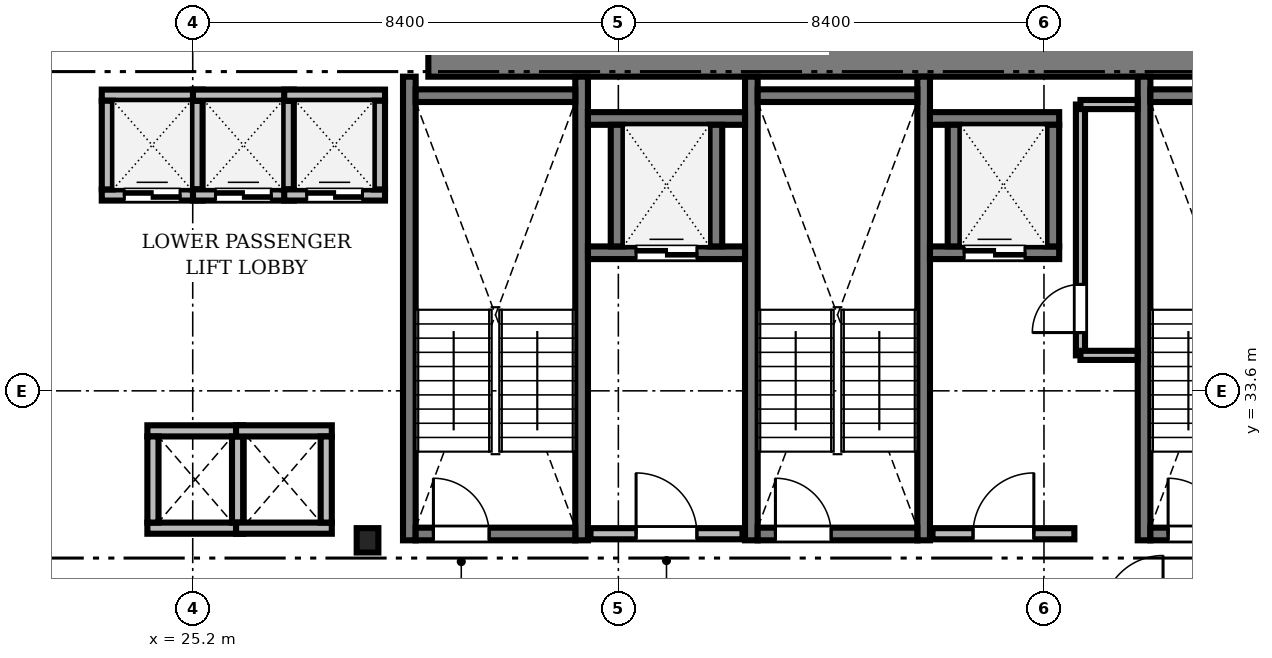
"""IFC4 building model, lengths in metres.
Left out: names, types, materials, properties, quantities, classifications, styles, units other than length and angle.
Written with IfcOpenShell. Run it as: python <this file> out.ifc"""

import sys

from ifc_helpers import new_model, si_unit, direction, frame, frame_2d, origin, origin_2d, place, context, subcontext, project, spatial, rectangle, i_section, extrude, source, transform, mapped, element, fill, save


model = new_model("IFC4")
c1 = context("Model", 3, precision=1e-05, world=origin(), true_north=direction((0.0, 1.0)))
c2 = subcontext(c1, "Body", "Model", "MODEL_VIEW")
j1 = project(units=[si_unit("LENGTHUNIT", "METRE"), si_unit("PLANEANGLEUNIT", "RADIAN")], contexts=[c1])
p1 = place(None, origin())
s1 = spatial("IfcSite", under=j1, at=p1, CompositionType="ELEMENT")
p2 = place(p1, origin())
s2 = spatial("IfcBuilding", under=s1, at=p2, CompositionType="ELEMENT")
p3 = place(p2, frame((0.0, 0.0, 31.25)))
s3 = spatial("IfcBuildingStorey", under=s2, at=p3, CompositionType="ELEMENT", Elevation=31.25)
m1 = source(origin(), c2, "Body", "SweptSolid", [
    extrude(rectangle(XDim=17.52, YDim=1.0, at=frame_2d((8.76, 0.0))), origin(), (0.0, 0.0, 1.0), 3.41),
])
p4 = place(p3, frame((29.85, 40.3, 0.0), z_axis=(0.0, 0.0, 1.0), x_axis=(1.0, 0.0, 0.0)))
e1 = element("IfcWall", 1, at=p4, inside=s3, PredefinedType="SHEAR", context=c2, shape_type="MappedRepresentation", body=[
    mapped(m1, transform((0.0, 0.0, 0.0), scale=1.0)),
])
m2 = source(origin(), c2, "Body", "SweptSolid", [
    extrude(i_section(OverallWidth=0.428, OverallDepth=0.481, WebThickness=0.04, FlangeThickness=0.063, FilletRadius=0.015, at=origin_2d()), origin(), (0.0, 0.0, 1.0), 3.41),
])
p5 = place(p3, frame((28.65, 30.65, 0.0), z_axis=(0.0, 0.0, 1.0), x_axis=(1.0, 0.0, 0.0)))
e2 = element("IfcColumn", 2, at=p5, inside=s3, PredefinedType="COLUMN", context=c2, shape_type="MappedRepresentation", body=[
    mapped(m2, transform((0.0, 0.0, 0.0), scale=1.0)),
])
m3 = source(origin(), c2, "Body", "SweptSolid", [
    extrude(rectangle(XDim=9.15, YDim=0.25, at=frame_2d((4.575, 0.0))), origin(), (0.0, 0.0, 1.0), 3.45),
])
for number, where, z_axis, x_axis in (
    (3, (29.475, 30.65, 0.0), (0.0, 0.0, 1.0), (0.0, 1.0, 0.0)),
    (4, (32.875, 30.65, 0.0), (0.0, 0.0, 1.0), (0.0, 1.0, 0.0)),
):
    element("IfcWall", number, at=place(p3, frame(where, z_axis=z_axis, x_axis=x_axis)), inside=s3, PredefinedType="SOLIDWALL", context=c2, shape_type="MappedRepresentation", body=[
        mapped(m3, transform((0.0, 0.0, 0.0), scale=1.0)),
    ])
m4 = source(origin(), c2, "Body", "SweptSolid", [
    extrude(rectangle(XDim=3.15, YDim=0.25, at=frame_2d((1.575, 0.0))), origin(), (0.0, 0.0, 1.0), 3.45),
])
p6 = place(p3, frame((29.6, 39.425, 0.0), z_axis=(0.0, 0.0, 1.0), x_axis=(1.0, 0.0, 0.0)))
e5 = element("IfcWall", 5, at=p6, inside=s3, PredefinedType="SOLIDWALL", context=c2, shape_type="MappedRepresentation", body=[
    mapped(m4, transform((0.0, 0.0, 0.0), scale=1.0)),
])
p7 = place(p3, frame((29.6, 30.775, 0.0), z_axis=(0.0, 0.0, 1.0), x_axis=(1.0, 0.0, 0.0)))
e6 = element("IfcWall", 6, at=p7, inside=s3, PredefinedType="SOLIDWALL", context=c2, shape_type="MappedRepresentation", body=[
    mapped(m4, transform((0.0, 0.0, 0.0), scale=1.0)),
])
m5 = source(origin(), c2, "Body", "SweptSolid", [
    extrude(rectangle(XDim=1.1, YDim=2.2, at=frame_2d((0.55, 1.1))), frame((0.0, 0.135, 0.0), z_axis=(0.0, -1.0, 0.0), x_axis=(1.0, 0.0, 0.0)), (0.0, 0.0, 1.0), 0.27),
])
p8 = place(p7, frame((0.35, 0.0, 0.0)))
e7 = element("IfcOpeningElement", 7, at=p8, cuts=e6, PredefinedType="OPENING", context=c2, shape_type="MappedRepresentation", body=[
    mapped(m5, transform((0.0, 0.0, 0.0), scale=1.0)),
])
for number, where, z_axis, x_axis in (
    (8, (36.225, 30.65, 0.0), (0.0, 0.0, 1.0), (0.0, 1.0, 0.0)),
    (9, (39.625, 30.65, 0.0), (0.0, 0.0, 1.0), (0.0, 1.0, 0.0)),
):
    element("IfcWall", number, at=place(p3, frame(where, z_axis=z_axis, x_axis=x_axis)), inside=s3, PredefinedType="SOLIDWALL", context=c2, shape_type="MappedRepresentation", body=[
        mapped(m3, transform((0.0, 0.0, 0.0), scale=1.0)),
    ])
p9 = place(p3, frame((36.35, 39.425, 0.0), z_axis=(0.0, 0.0, 1.0), x_axis=(1.0, 0.0, 0.0)))
e10 = element("IfcWall", 10, at=p9, inside=s3, PredefinedType="SOLIDWALL", context=c2, shape_type="MappedRepresentation", body=[
    mapped(m4, transform((0.0, 0.0, 0.0), scale=1.0)),
])
p10 = place(p3, frame((36.35, 30.775, 0.0), z_axis=(0.0, 0.0, 1.0), x_axis=(1.0, 0.0, 0.0)))
e11 = element("IfcWall", 11, at=p10, inside=s3, PredefinedType="SOLIDWALL", context=c2, shape_type="MappedRepresentation", body=[
    mapped(m4, transform((0.0, 0.0, 0.0), scale=1.0)),
])
p11 = place(p10, frame((0.35, 0.0, 0.0)))
e12 = element("IfcOpeningElement", 12, at=p11, cuts=e11, PredefinedType="OPENING", context=c2, shape_type="MappedRepresentation", body=[
    mapped(m5, transform((0.0, 0.0, 0.0), scale=1.0)),
])
p12 = place(p3, frame((43.975, 30.65, 0.0), z_axis=(0.0, 0.0, 1.0), x_axis=(0.0, 1.0, 0.0)))
e13 = element("IfcWall", 13, at=p12, inside=s3, PredefinedType="SOLIDWALL", context=c2, shape_type="MappedRepresentation", body=[
    mapped(m3, transform((0.0, 0.0, 0.0), scale=1.0)),
])
p13 = place(p3, frame((44.1, 39.425, 0.0), z_axis=(0.0, 0.0, 1.0), x_axis=(1.0, 0.0, 0.0)))
e14 = element("IfcWall", 14, at=p13, inside=s3, PredefinedType="SOLIDWALL", context=c2, shape_type="MappedRepresentation", body=[
    mapped(m4, transform((0.0, 0.0, 0.0), scale=1.0)),
])
p14 = place(p3, frame((44.1, 30.775, 0.0), z_axis=(0.0, 0.0, 1.0), x_axis=(1.0, 0.0, 0.0)))
e15 = element("IfcWall", 15, at=p14, inside=s3, PredefinedType="SOLIDWALL", context=c2, shape_type="MappedRepresentation", body=[
    mapped(m4, transform((0.0, 0.0, 0.0), scale=1.0)),
])
p15 = place(p14, frame((0.35, 0.0, 0.0)))
e16 = element("IfcOpeningElement", 16, at=p15, cuts=e15, PredefinedType="OPENING", context=c2, shape_type="MappedRepresentation", body=[
    mapped(m5, transform((0.0, 0.0, 0.0), scale=1.0)),
])
m6 = source(origin(), c2, "Body", "SweptSolid", [
    extrude(rectangle(XDim=3.0, YDim=0.22, at=frame_2d((1.5, 0.0))), origin(), (0.0, 0.0, 1.0), 3.41),
])
p16 = place(p3, frame((33.05, 30.78, 0.0), z_axis=(0.0, 0.0, 1.0), x_axis=(1.0, 0.0, 0.0)))
e17 = element("IfcWall", 17, at=p16, inside=s3, PredefinedType="SOLIDWALL", context=c2, shape_type="MappedRepresentation", body=[
    mapped(m6, transform((0.0, 0.0, 0.0), scale=1.0)),
])
m7 = source(origin(), c2, "Body", "SweptSolid", [
    extrude(rectangle(XDim=1.2, YDim=2.2, at=frame_2d((0.6, 1.1))), frame((0.0, 0.12, 0.0), z_axis=(0.0, -1.0, 0.0), x_axis=(1.0, 0.0, 0.0)), (0.0, 0.0, 1.0), 0.24),
])
p17 = place(p16, frame((0.9, 0.0, 0.0)))
e18 = element("IfcOpeningElement", 18, at=p17, cuts=e17, PredefinedType="OPENING", context=c2, shape_type="MappedRepresentation", body=[
    mapped(m7, transform((0.0, 0.0, 0.0), scale=1.0)),
])
m8 = source(origin(), c2, "Body", "SweptSolid", [
    extrude(rectangle(XDim=2.8, YDim=0.22, at=frame_2d((1.4, 0.0))), origin(), (0.0, 0.0, 1.0), 3.41),
])
p18 = place(p3, frame((39.8, 30.78, 0.0), z_axis=(0.0, 0.0, 1.0), x_axis=(1.0, 0.0, 0.0)))
e19 = element("IfcWall", 19, at=p18, inside=s3, PredefinedType="SOLIDWALL", context=c2, shape_type="MappedRepresentation", body=[
    mapped(m8, transform((0.0, 0.0, 0.0), scale=1.0)),
])
p19 = place(p18, frame((0.8, 0.0, 0.0)))
e20 = element("IfcOpeningElement", 20, at=p19, cuts=e19, PredefinedType="OPENING", context=c2, shape_type="MappedRepresentation", body=[
    mapped(m7, transform((0.0, 0.0, 0.0), scale=1.0)),
])
m9 = source(origin(), c2, "Body", "SweptSolid", [
    extrude(rectangle(XDim=1.99, YDim=0.22, at=frame_2d((0.995, 0.0))), origin(), (0.0, 0.0, 1.0), 3.41),
])
p20 = place(p3, frame((23.405, 37.465, 0.0), z_axis=(0.0, 0.0, 1.0), x_axis=(1.0, 0.0, 0.0)))
e21 = element("IfcWall", 21, at=p20, inside=s3, PredefinedType="SOLIDWALL", context=c2, shape_type="MappedRepresentation", body=[
    mapped(m9, transform((0.0, 0.0, 0.0), scale=1.0)),
])
m10 = source(origin(), c2, "Body", "SweptSolid", [
    extrude(rectangle(XDim=1.1, YDim=2.2, at=frame_2d((0.55, 1.1))), frame((0.0, 0.12, 0.0), z_axis=(0.0, -1.0, 0.0), x_axis=(1.0, 0.0, 0.0)), (0.0, 0.0, 1.0), 0.24),
])
p21 = place(p20, frame((0.445, 0.0, 0.0)))
e22 = element("IfcOpeningElement", 22, at=p21, cuts=e21, PredefinedType="OPENING", context=c2, shape_type="MappedRepresentation", body=[
    mapped(m10, transform((0.0, 0.0, 0.0), scale=1.0)),
])
p22 = place(p3, frame((23.405, 39.435, 0.0), z_axis=(0.0, 0.0, 1.0), x_axis=(1.0, 0.0, 0.0)))
e23 = element("IfcWall", 23, at=p22, inside=s3, PredefinedType="SOLIDWALL", context=c2, shape_type="MappedRepresentation", body=[
    mapped(m9, transform((0.0, 0.0, 0.0), scale=1.0)),
])
m11 = source(origin(), c2, "Body", "SweptSolid", [
    extrude(rectangle(XDim=1.75, YDim=0.22, at=frame_2d((0.875, 0.0))), origin(), (0.0, 0.0, 1.0), 3.41),
])
for number, where, z_axis, x_axis in (
    (24, (23.515, 37.575, 0.0), (0.0, 0.0, 1.0), (0.0, 1.0, 0.0)),
    (25, (25.285, 37.575, 0.0), (0.0, 0.0, 1.0), (0.0, 1.0, 0.0)),
):
    element("IfcWall", number, at=place(p3, frame(where, z_axis=z_axis, x_axis=x_axis)), inside=s3, PredefinedType="SOLIDWALL", context=c2, shape_type="MappedRepresentation", body=[
        mapped(m11, transform((0.0, 0.0, 0.0), scale=1.0)),
    ])
p23 = place(p3, frame((25.205, 37.465, 0.0), z_axis=(0.0, 0.0, 1.0), x_axis=(1.0, 0.0, 0.0)))
e26 = element("IfcWall", 26, at=p23, inside=s3, PredefinedType="SOLIDWALL", context=c2, shape_type="MappedRepresentation", body=[
    mapped(m9, transform((0.0, 0.0, 0.0), scale=1.0)),
])
p24 = place(p23, frame((0.445, 0.0, 0.0)))
e27 = element("IfcOpeningElement", 27, at=p24, cuts=e26, PredefinedType="OPENING", context=c2, shape_type="MappedRepresentation", body=[
    mapped(m10, transform((0.0, 0.0, 0.0), scale=1.0)),
])
p25 = place(p3, frame((25.205, 39.435, 0.0), z_axis=(0.0, 0.0, 1.0), x_axis=(1.0, 0.0, 0.0)))
e28 = element("IfcWall", 28, at=p25, inside=s3, PredefinedType="SOLIDWALL", context=c2, shape_type="MappedRepresentation", body=[
    mapped(m9, transform((0.0, 0.0, 0.0), scale=1.0)),
])
p26 = place(p3, frame((27.085, 37.575, 0.0), z_axis=(0.0, 0.0, 1.0), x_axis=(0.0, 1.0, 0.0)))
e29 = element("IfcWall", 29, at=p26, inside=s3, PredefinedType="SOLIDWALL", context=c2, shape_type="MappedRepresentation", body=[
    mapped(m11, transform((0.0, 0.0, 0.0), scale=1.0)),
])
m12 = source(origin(), c2, "Body", "SweptSolid", [
    extrude(rectangle(XDim=1.99, YDim=0.22, at=frame_2d((0.995, 0.0))), origin(), (0.0, 0.0, 1.0), 3.41),
])
p27 = place(p3, frame((27.005, 37.465, 0.0), z_axis=(0.0, 0.0, 1.0), x_axis=(1.0, 0.0, 0.0)))
e30 = element("IfcWall", 30, at=p27, inside=s3, PredefinedType="SOLIDWALL", context=c2, shape_type="MappedRepresentation", body=[
    mapped(m12, transform((0.0, 0.0, 0.0), scale=1.0)),
])
p28 = place(p27, frame((0.445, 0.0, 0.0)))
e31 = element("IfcOpeningElement", 31, at=p28, cuts=e30, PredefinedType="OPENING", context=c2, shape_type="MappedRepresentation", body=[
    mapped(m10, transform((0.0, 0.0, 0.0), scale=1.0)),
])
p29 = place(p3, frame((27.005, 39.435, 0.0), z_axis=(0.0, 0.0, 1.0), x_axis=(1.0, 0.0, 0.0)))
e32 = element("IfcWall", 32, at=p29, inside=s3, PredefinedType="SOLIDWALL", context=c2, shape_type="MappedRepresentation", body=[
    mapped(m12, transform((0.0, 0.0, 0.0), scale=1.0)),
])
p30 = place(p3, frame((28.885, 37.575, 0.0), z_axis=(0.0, 0.0, 1.0), x_axis=(0.0, 1.0, 0.0)))
e33 = element("IfcWall", 33, at=p30, inside=s3, PredefinedType="SOLIDWALL", context=c2, shape_type="MappedRepresentation", body=[
    mapped(m11, transform((0.0, 0.0, 0.0), scale=1.0)),
])
m13 = source(origin(), c2, "Body", "SweptSolid", [
    extrude(rectangle(XDim=3.1, YDim=0.25, at=frame_2d((1.55, 0.0))), origin(), (0.0, 0.0, 1.0), 3.41),
])
p31 = place(p3, frame((33.0, 36.325, 0.0), z_axis=(0.0, 0.0, 1.0), x_axis=(1.0, 0.0, 0.0)))
e34 = element("IfcWall", 34, at=p31, inside=s3, PredefinedType="SOLIDWALL", context=c2, shape_type="MappedRepresentation", body=[
    mapped(m13, transform((0.0, 0.0, 0.0), scale=1.0)),
])
m14 = source(origin(), c2, "Body", "SweptSolid", [
    extrude(rectangle(XDim=1.2, YDim=2.25, at=frame_2d((0.6, 1.125))), frame((0.0, 0.135, 0.0), z_axis=(0.0, -1.0, 0.0), x_axis=(1.0, 0.0, 0.0)), (0.0, 0.0, 1.0), 0.27),
])
p32 = place(p31, frame((0.95, 0.0, 0.0)))
e35 = element("IfcOpeningElement", 35, at=p32, cuts=e34, PredefinedType="OPENING", context=c2, shape_type="MappedRepresentation", body=[
    mapped(m14, transform((0.0, 0.0, 0.0), scale=1.0)),
])
p33 = place(p3, frame((33.0, 38.975, 0.0), z_axis=(0.0, 0.0, 1.0), x_axis=(1.0, 0.0, 0.0)))
e36 = element("IfcWall", 36, at=p33, inside=s3, PredefinedType="SOLIDWALL", context=c2, shape_type="MappedRepresentation", body=[
    mapped(m13, transform((0.0, 0.0, 0.0), scale=1.0)),
])
m15 = source(origin(), c2, "Body", "SweptSolid", [
    extrude(rectangle(XDim=2.4, YDim=0.25, at=frame_2d((1.2, 0.0))), origin(), (0.0, 0.0, 1.0), 3.41),
])
for number, where, z_axis, x_axis in (
    (37, (33.575, 36.45, 0.0), (0.0, 0.0, 1.0), (0.0, 1.0, 0.0)),
    (38, (35.525, 36.45, 0.0), (0.0, 0.0, 1.0), (0.0, 1.0, 0.0)),
):
    element("IfcWall", number, at=place(p3, frame(where, z_axis=z_axis, x_axis=x_axis)), inside=s3, PredefinedType="SOLIDWALL", context=c2, shape_type="MappedRepresentation", body=[
        mapped(m15, transform((0.0, 0.0, 0.0), scale=1.0)),
    ])
m16 = source(origin(), c2, "Body", "SweptSolid", [
    extrude(rectangle(XDim=2.55, YDim=0.25, at=frame_2d((1.275, 0.0))), origin(), (0.0, 0.0, 1.0), 3.41),
])
p34 = place(p3, frame((39.75, 36.325, 0.0), z_axis=(0.0, 0.0, 1.0), x_axis=(1.0, 0.0, 0.0)))
e39 = element("IfcWall", 39, at=p34, inside=s3, PredefinedType="SOLIDWALL", context=c2, shape_type="MappedRepresentation", body=[
    mapped(m16, transform((0.0, 0.0, 0.0), scale=1.0)),
])
p35 = place(p34, frame((0.675, 0.0, 0.0)))
e40 = element("IfcOpeningElement", 40, at=p35, cuts=e39, PredefinedType="OPENING", context=c2, shape_type="MappedRepresentation", body=[
    mapped(m14, transform((0.0, 0.0, 0.0), scale=1.0)),
])
p36 = place(p3, frame((39.75, 38.975, 0.0), z_axis=(0.0, 0.0, 1.0), x_axis=(1.0, 0.0, 0.0)))
e41 = element("IfcWall", 41, at=p36, inside=s3, PredefinedType="SOLIDWALL", context=c2, shape_type="MappedRepresentation", body=[
    mapped(m16, transform((0.0, 0.0, 0.0), scale=1.0)),
])
for number, where, z_axis, x_axis in (
    (42, (40.225, 36.45, 0.0), (0.0, 0.0, 1.0), (0.0, 1.0, 0.0)),
    (43, (42.175, 36.45, 0.0), (0.0, 0.0, 1.0), (0.0, 1.0, 0.0)),
):
    element("IfcWall", number, at=place(p3, frame(where, z_axis=z_axis, x_axis=x_axis)), inside=s3, PredefinedType="SOLIDWALL", context=c2, shape_type="MappedRepresentation", body=[
        mapped(m15, transform((0.0, 0.0, 0.0), scale=1.0)),
    ])
m17 = source(origin(), c2, "Body", "SweptSolid", [
    extrude(rectangle(XDim=1.89, YDim=0.22, at=frame_2d((0.945, 0.0))), origin(), (0.0, 0.0, 1.0), 3.41),
])
for number, where, z_axis, x_axis in (
    (44, (24.305, 30.89, 0.0), (0.0, 0.0, 1.0), (1.0, 0.0, 0.0)),
    (45, (24.305, 32.81, 0.0), (0.0, 0.0, 1.0), (1.0, 0.0, 0.0)),
):
    element("IfcWall", number, at=place(p3, frame(where, z_axis=z_axis, x_axis=x_axis)), inside=s3, PredefinedType="SOLIDWALL", context=c2, shape_type="MappedRepresentation", body=[
        mapped(m17, transform((0.0, 0.0, 0.0), scale=1.0)),
    ])
m18 = source(origin(), c2, "Body", "SweptSolid", [
    extrude(rectangle(XDim=1.7, YDim=0.22, at=frame_2d((0.85, 0.0))), origin(), (0.0, 0.0, 1.0), 3.41),
])
for number, where, z_axis, x_axis in (
    (46, (24.415, 31.0, 0.0), (0.0, 0.0, 1.0), (0.0, 1.0, 0.0)),
    (47, (26.085, 31.0, 0.0), (0.0, 0.0, 1.0), (0.0, 1.0, 0.0)),
):
    element("IfcWall", number, at=place(p3, frame(where, z_axis=z_axis, x_axis=x_axis)), inside=s3, PredefinedType="SOLIDWALL", context=c2, shape_type="MappedRepresentation", body=[
        mapped(m18, transform((0.0, 0.0, 0.0), scale=1.0)),
    ])
for number, where, z_axis, x_axis in (
    (48, (26.055, 30.89, 0.0), (0.0, 0.0, 1.0), (1.0, 0.0, 0.0)),
    (49, (26.055, 32.81, 0.0), (0.0, 0.0, 1.0), (1.0, 0.0, 0.0)),
):
    element("IfcWall", number, at=place(p3, frame(where, z_axis=z_axis, x_axis=x_axis)), inside=s3, PredefinedType="SOLIDWALL", context=c2, shape_type="MappedRepresentation", body=[
        mapped(m17, transform((0.0, 0.0, 0.0), scale=1.0)),
    ])
p37 = place(p3, frame((27.835, 31.0, 0.0), z_axis=(0.0, 0.0, 1.0), x_axis=(0.0, 1.0, 0.0)))
e50 = element("IfcWall", 50, at=p37, inside=s3, PredefinedType="SOLIDWALL", context=c2, shape_type="MappedRepresentation", body=[
    mapped(m18, transform((0.0, 0.0, 0.0), scale=1.0)),
])
m19 = source(origin(), c2, "Body", "SweptSolid", [
    extrude(rectangle(XDim=4.95, YDim=0.18, at=frame_2d((2.475, 0.0))), origin(), (0.0, 0.0, 1.0), 3.41),
])
p38 = place(p3, frame((42.72, 34.3, 0.0), z_axis=(0.0, 0.0, 1.0), x_axis=(0.0, 1.0, 0.0)))
e51 = element("IfcWall", 51, at=p38, inside=s3, PredefinedType="PARTITIONING", context=c2, shape_type="MappedRepresentation", body=[
    mapped(m19, transform((0.0, 0.0, 0.0), scale=1.0)),
])
m20 = source(origin(), c2, "Body", "SweptSolid", [
    extrude(rectangle(XDim=0.95, YDim=2.15, at=frame_2d((0.475, 1.075))), frame((0.0, 0.1, 0.0), z_axis=(0.0, -1.0, 0.0), x_axis=(1.0, 0.0, 0.0)), (0.0, 0.0, 1.0), 0.2),
])
p39 = place(p38, frame((0.45, 0.0, 0.0)))
e52 = element("IfcOpeningElement", 52, at=p39, cuts=e51, PredefinedType="OPENING", context=c2, shape_type="MappedRepresentation", body=[
    mapped(m20, transform((0.0, 0.0, 0.0), scale=1.0)),
])
m21 = source(origin(), c2, "Body", "SweptSolid", [
    extrude(rectangle(XDim=1.128, YDim=0.18, at=frame_2d((0.564, 0.0))), origin(), (0.0, 0.0, 1.0), 3.41),
])
for number, where, z_axis, x_axis in (
    (53, (42.72, 34.3, 0.0), (0.0, 0.0, 1.0), (1.0, 0.0, 0.0)),
    (54, (42.72, 39.25, 0.0), (0.0, 0.0, 1.0), (1.0, 0.0, 0.0)),
):
    element("IfcWall", number, at=place(p3, frame(where, z_axis=z_axis, x_axis=x_axis)), inside=s3, PredefinedType="PARTITIONING", context=c2, shape_type="MappedRepresentation", body=[
        mapped(m21, transform((0.0, 0.0, 0.0), scale=1.0)),
    ])
m22 = source(origin(), c2, "Body", "SweptSolid", [
    extrude(rectangle(XDim=1.1, YDim=2.2, at=frame_2d((0.55, 1.1))), frame((0.0, 0.025, 0.0), z_axis=(0.0, -1.0, 0.0), x_axis=(1.0, 0.0, 0.0)), (0.0, 0.0, 1.0), 0.05),
])
p40 = place(p8, origin())
e55 = element("IfcDoor", 55, at=p40, inside=s3, OperationType="SINGLE_SWING_LEFT", PredefinedType="DOOR", context=c2, shape_type="MappedRepresentation", body=[
    mapped(m22, transform((0.0, 0.0, 0.0), scale=1.0)),
])
fill(e7, e55)
p41 = place(p11, origin())
e56 = element("IfcDoor", 56, at=p41, inside=s3, OperationType="SINGLE_SWING_LEFT", PredefinedType="DOOR", context=c2, shape_type="MappedRepresentation", body=[
    mapped(m22, transform((0.0, 0.0, 0.0), scale=1.0)),
])
fill(e12, e56)
p42 = place(p15, origin())
e57 = element("IfcDoor", 57, at=p42, inside=s3, OperationType="SINGLE_SWING_LEFT", PredefinedType="DOOR", context=c2, shape_type="MappedRepresentation", body=[
    mapped(m22, transform((0.0, 0.0, 0.0), scale=1.0)),
])
fill(e16, e57)
m23 = source(origin(), c2, "Body", "SweptSolid", [
    extrude(rectangle(XDim=1.2, YDim=2.2, at=frame_2d((0.6, 1.1))), frame((0.0, 0.025, 0.0), z_axis=(0.0, -1.0, 0.0), x_axis=(1.0, 0.0, 0.0)), (0.0, 0.0, 1.0), 0.05),
])
p43 = place(p17, origin())
e58 = element("IfcDoor", 58, at=p43, inside=s3, OperationType="SINGLE_SWING_LEFT", PredefinedType="DOOR", context=c2, shape_type="MappedRepresentation", body=[
    mapped(m23, transform((0.0, 0.0, 0.0), scale=1.0)),
])
fill(e18, e58)
p44 = place(p19, origin())
e59 = element("IfcDoor", 59, at=p44, inside=s3, OperationType="SINGLE_SWING_RIGHT", PredefinedType="DOOR", context=c2, shape_type="MappedRepresentation", body=[
    mapped(m23, transform((0.0, 0.0, 0.0), scale=1.0)),
])
fill(e20, e59)
p45 = place(p21, origin())
e60 = element("IfcDoor", 60, at=p45, inside=s3, OperationType="DOUBLE_DOOR_SLIDING", PredefinedType="DOOR", context=c2, shape_type="MappedRepresentation", body=[
    mapped(m22, transform((0.0, 0.0, 0.0), scale=1.0)),
])
fill(e22, e60)
p46 = place(p24, origin())
e61 = element("IfcDoor", 61, at=p46, inside=s3, OperationType="DOUBLE_DOOR_SLIDING", PredefinedType="DOOR", context=c2, shape_type="MappedRepresentation", body=[
    mapped(m22, transform((0.0, 0.0, 0.0), scale=1.0)),
])
fill(e27, e61)
p47 = place(p28, origin())
e62 = element("IfcDoor", 62, at=p47, inside=s3, OperationType="DOUBLE_DOOR_SLIDING", PredefinedType="DOOR", context=c2, shape_type="MappedRepresentation", body=[
    mapped(m22, transform((0.0, 0.0, 0.0), scale=1.0)),
])
fill(e31, e62)
m24 = source(origin(), c2, "Body", "SweptSolid", [
    extrude(rectangle(XDim=1.2, YDim=2.25, at=frame_2d((0.6, 1.125))), frame((0.0, 0.025, 0.0), z_axis=(0.0, -1.0, 0.0), x_axis=(1.0, 0.0, 0.0)), (0.0, 0.0, 1.0), 0.05),
])
p48 = place(p32, origin())
e63 = element("IfcDoor", 63, at=p48, inside=s3, OperationType="DOUBLE_DOOR_SLIDING", PredefinedType="DOOR", context=c2, shape_type="MappedRepresentation", body=[
    mapped(m24, transform((0.0, 0.0, 0.0), scale=1.0)),
])
fill(e35, e63)
p49 = place(p35, origin())
e64 = element("IfcDoor", 64, at=p49, inside=s3, OperationType="DOUBLE_DOOR_SLIDING", PredefinedType="DOOR", context=c2, shape_type="MappedRepresentation", body=[
    mapped(m24, transform((0.0, 0.0, 0.0), scale=1.0)),
])
fill(e40, e64)
m25 = source(origin(), c2, "Body", "SweptSolid", [
    extrude(rectangle(XDim=0.95, YDim=2.15, at=frame_2d((0.475, 1.075))), frame((0.0, 0.025, 0.0), z_axis=(0.0, -1.0, 0.0), x_axis=(1.0, 0.0, 0.0)), (0.0, 0.0, 1.0), 0.05),
])
p50 = place(p39, origin())
e65 = element("IfcDoor", 65, at=p50, inside=s3, OperationType="SINGLE_SWING_LEFT", PredefinedType="DOOR", context=c2, shape_type="MappedRepresentation", body=[
    mapped(m25, transform((0.0, 0.0, 0.0), scale=1.0)),
])
fill(e52, e65)
save(model, sys.argv[1])
